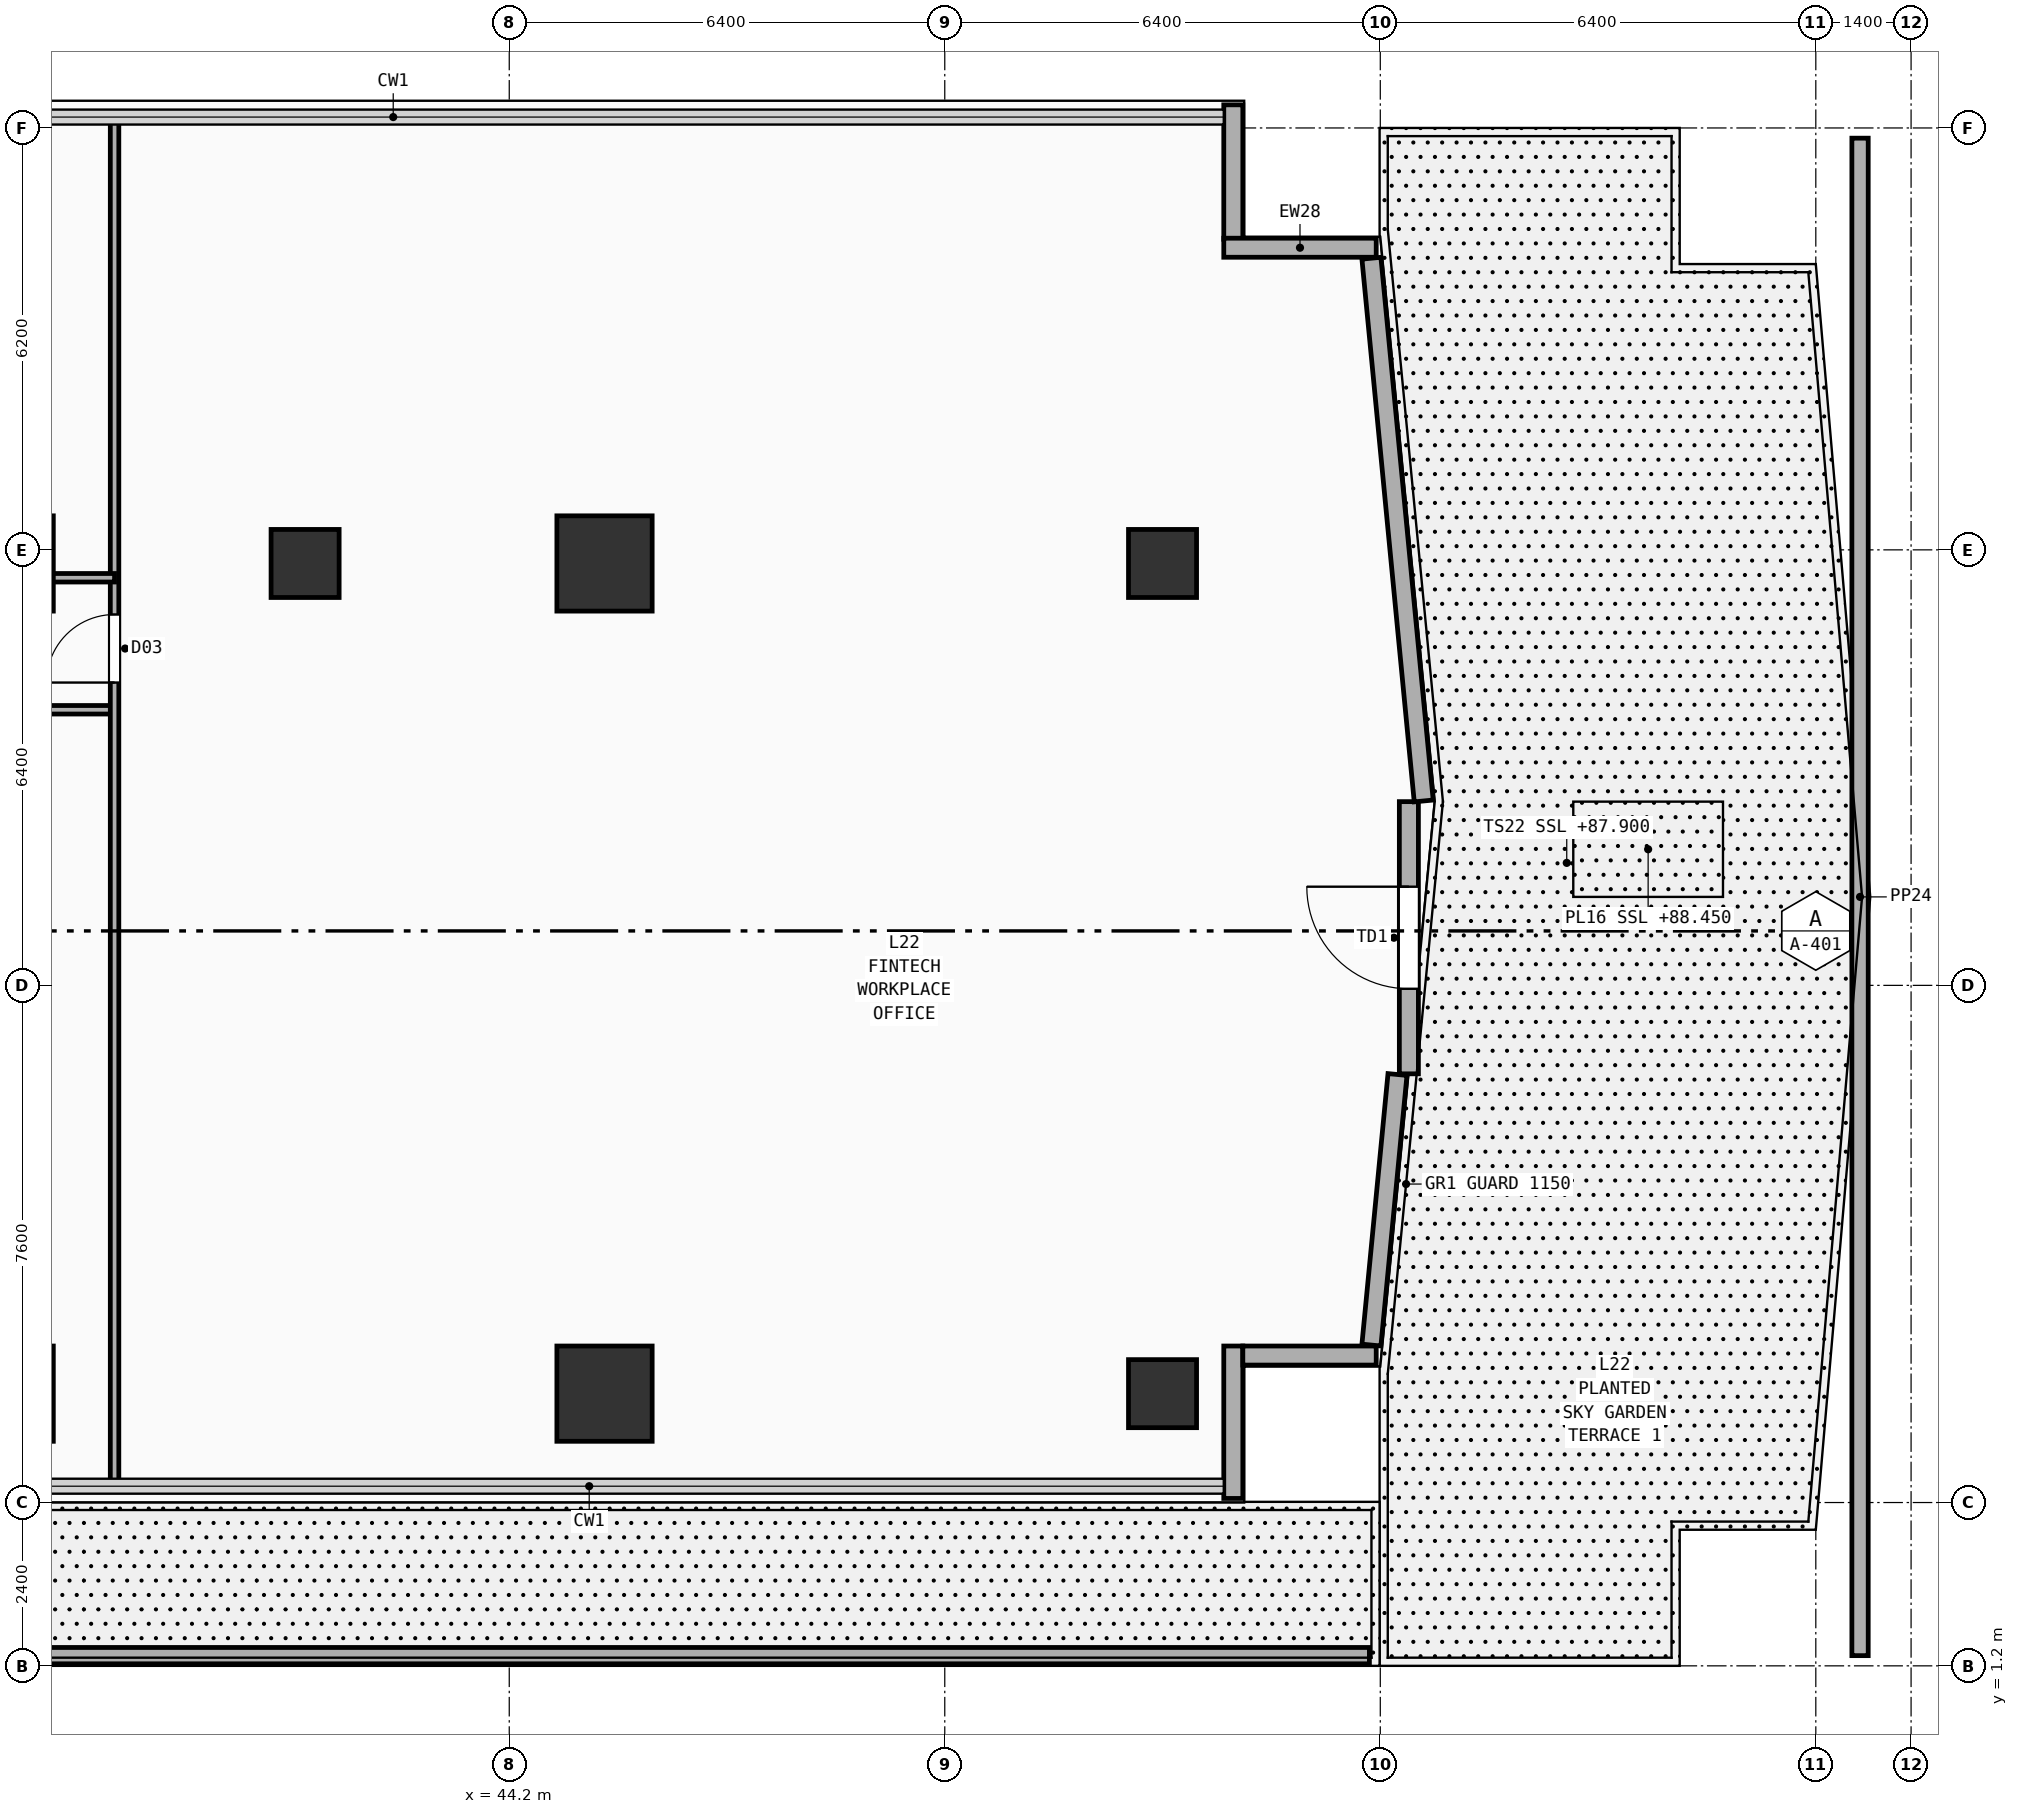
"""IFC4 building model, lengths in metres.
Left out: names, types, materials, properties, quantities, classifications, styles, units other than length and angle.
Written with IfcOpenShell. Run it as: python <this file> out.ifc"""

import sys

from ifc_helpers import new_model, si_unit, direction, frame, frame_2d, origin, origin_2d, place, context, subcontext, project, spatial, rectangle, extrude, element, fill, save


model = new_model("IFC4")
c1 = context("Model", 3, precision=1e-05, world=origin(), true_north=direction((0.0, 1.0)))
c2 = subcontext(c1, "Body", "Model", "MODEL_VIEW")
j1 = project(units=[si_unit("LENGTHUNIT", "METRE"), si_unit("PLANEANGLEUNIT", "RADIAN")], contexts=[c1])
p1 = place(None, origin())
s1 = spatial("IfcSite", under=j1, at=p1, CompositionType="ELEMENT")
p2 = place(p1, origin())
s2 = spatial("IfcBuilding", under=s1, at=p2, CompositionType="ELEMENT")
p3 = place(p2, frame((0.0, 0.0, 87.9)))
s3 = spatial("IfcBuildingStorey", under=s2, at=p3, CompositionType="ELEMENT", Elevation=87.9)
for number, where, z_axis, x_axis in (
    (1, (36.8, 5.2, 0.0), (0.0, 0.0, 1.0), (1.0, 0.0, 0.0)),
    (2, (45.6, 5.2, 0.0), (0.0, 0.0, 1.0), (1.0, 0.0, 0.0)),
    (3, (36.8, 17.4, 0.0), (0.0, 0.0, 1.0), (1.0, 0.0, 0.0)),
    (4, (45.6, 17.4, 0.0), (0.0, 0.0, 1.0), (1.0, 0.0, 0.0)),
):
    element("IfcColumn", number, at=place(p3, frame(where, z_axis=z_axis, x_axis=x_axis)), inside=s3, PredefinedType="COLUMN", context=c2, shape_type="SweptSolid", body=[
        extrude(rectangle(XDim=1.4, YDim=1.4, at=origin_2d()), origin(), (0.0, 0.0, 1.0), 3.54),
    ])
for number, where, z_axis, x_axis in (
    (5, (53.8, 5.2, 0.0), (0.0, 0.0, 1.0), (1.0, 0.0, 0.0)),
    (6, (53.8, 17.4, 0.0), (0.0, 0.0, 1.0), (1.0, 0.0, 0.0)),
    (7, (41.2, 17.4, 0.0), (0.0, 0.0, 1.0), (1.0, 0.0, 0.0)),
):
    element("IfcColumn", number, at=place(p3, frame(where, z_axis=z_axis, x_axis=x_axis)), inside=s3, PredefinedType="COLUMN", context=c2, shape_type="SweptSolid", body=[
        extrude(rectangle(XDim=1.0, YDim=1.0, at=origin_2d()), origin(), (0.0, 0.0, 1.0), 3.54),
    ])
p4 = place(p3, frame((57.42, 9.9, 0.0), z_axis=(0.0, 0.0, 1.0), x_axis=(0.0, 1.0, 0.0)))
e8 = element("IfcWall", 8, at=p4, inside=s3, PredefinedType="SOLIDWALL", context=c2, shape_type="SweptSolid", body=[
    extrude(rectangle(XDim=4.0, YDim=0.28, at=frame_2d((2.0, 0.0))), origin(), (0.0, 0.0, 1.0), 3.54),
])
p5 = place(p4, frame((1.25, 0.0, 0.0)))
e9 = element("IfcOpeningElement", 9, at=p5, cuts=e8, PredefinedType="OPENING", context=c2, shape_type="SweptSolid", body=[
    extrude(rectangle(XDim=1.5, YDim=2.25, at=frame_2d((0.75, 1.125))), frame((0.0, 0.15, 0.0), z_axis=(0.0, -1.0, 0.0), x_axis=(1.0, 0.0, 0.0)), (0.0, 0.0, 1.0), 0.3),
])
p6 = place(p3, frame((64.05, 1.35, 0.0), z_axis=(0.0, 0.0, 1.0), x_axis=(0.0, 1.0, 0.0)))
e10 = element("IfcWall", 10, at=p6, inside=s3, PredefinedType="PARAPET", context=c2, shape_type="SweptSolid", body=[
    extrude(rectangle(XDim=22.3, YDim=0.24, at=frame_2d((11.15, 0.0))), origin(), (0.0, 0.0, 1.0), 0.42),
])
p7 = place(p3, frame((1.55, 1.35, 0.0), z_axis=(0.0, 0.0, 1.0), x_axis=(1.0, 0.0, 0.0)))
e11 = element("IfcWall", 11, at=p7, inside=s3, PredefinedType="PARAPET", context=c2, shape_type="SweptSolid", body=[
    extrude(rectangle(XDim=55.29, YDim=0.24, at=frame_2d((27.645, 0.0))), origin(), (0.0, 0.0, 1.0), 0.42),
])
p8 = place(p3, frame((54.84, 3.66, 0.0), z_axis=(0.0, 0.0, 1.0), x_axis=(0.0, 1.0, 0.0)))
e12 = element("IfcWall", 12, at=p8, inside=s3, PredefinedType="SOLIDWALL", context=c2, shape_type="SweptSolid", body=[
    extrude(rectangle(XDim=2.24, YDim=0.28, at=frame_2d((1.12, 0.0))), origin(), (0.0, 0.0, 1.0), 3.54),
])
p9 = place(p3, frame((54.98, 5.76, 0.0), z_axis=(0.0, 0.0, 1.0), x_axis=(1.0, 0.0, 0.0)))
e13 = element("IfcWall", 13, at=p9, inside=s3, PredefinedType="SOLIDWALL", context=c2, shape_type="SweptSolid", body=[
    extrude(rectangle(XDim=1.96, YDim=0.28, at=frame_2d((0.98, 0.0))), origin(), (0.0, 0.0, 1.0), 3.54),
])
p10 = place(p3, frame((54.84, 22.165, 0.0), z_axis=(0.0, 0.0, 1.0), x_axis=(0.0, 1.0, 0.0)))
e14 = element("IfcWall", 14, at=p10, inside=s3, PredefinedType="SOLIDWALL", context=c2, shape_type="SweptSolid", body=[
    extrude(rectangle(XDim=1.975, YDim=0.28, at=frame_2d((0.987, 0.0))), origin(), (0.0, 0.0, 1.0), 3.54),
])
p11 = place(p3, frame((54.7, 22.04, 0.0), z_axis=(0.0, 0.0, 1.0), x_axis=(1.0, 0.0, 0.0)))
e15 = element("IfcWall", 15, at=p11, inside=s3, PredefinedType="SOLIDWALL", context=c2, shape_type="SweptSolid", body=[
    extrude(rectangle(XDim=2.24, YDim=0.28, at=frame_2d((1.12, 0.0))), origin(), (0.0, 0.0, 1.0), 3.54),
])
p12 = place(p3, frame((56.869, 5.914, 0.0), z_axis=(0.0, 0.0, 1.0), x_axis=(0.095962807789, 0.99538492028, 0.0)))
e16 = element("IfcWall", 16, at=p12, inside=s3, PredefinedType="SOLIDWALL", context=c2, shape_type="SweptSolid", body=[
    extrude(rectangle(XDim=3.994, YDim=0.28, at=frame_2d((1.997, 0.0))), origin(), (0.0, 0.0, 1.0), 3.54),
])
p13 = place(p3, frame((57.638, 13.91, 0.0), z_axis=(0.0, 0.0, 1.0), x_axis=(-0.095943464516, 0.995386784932, 0.0)))
e17 = element("IfcWall", 17, at=p13, inside=s3, PredefinedType="SOLIDWALL", context=c2, shape_type="SweptSolid", body=[
    extrude(rectangle(XDim=8.013, YDim=0.28, at=frame_2d((4.006, 0.0))), origin(), (0.0, 0.0, 1.0), 3.54),
])
p14 = place(p3, frame((31.95, 15.25, 0.0), z_axis=(0.0, 0.0, 1.0), x_axis=(1.0, 0.0, 0.0)))
e18 = element("IfcWall", 18, at=p14, inside=s3, PredefinedType="PARTITIONING", context=c2, shape_type="SweptSolid", body=[
    extrude(rectangle(XDim=6.45, YDim=0.125, at=frame_2d((3.225, 0.0))), origin(), (0.0, 0.0, 1.0), 3.09),
])
p15 = place(p14, frame((2.275, 0.0, 0.0)))
e19 = element("IfcOpeningElement", 19, at=p15, cuts=e18, PredefinedType="OPENING", context=c2, shape_type="SweptSolid", body=[
    extrude(rectangle(XDim=0.95, YDim=2.15, at=frame_2d((0.475, 1.075))), frame((0.0, 0.073, 0.0), z_axis=(0.0, -1.0, 0.0), x_axis=(1.0, 0.0, 0.0)), (0.0, 0.0, 1.0), 0.145),
])
p16 = place(p3, frame((38.4, 3.84, 0.0), z_axis=(0.0, 0.0, 1.0), x_axis=(0.0, 1.0, 0.0)))
e20 = element("IfcWall", 20, at=p16, inside=s3, PredefinedType="PARTITIONING", context=c2, shape_type="SweptSolid", body=[
    extrude(rectangle(XDim=20.12, YDim=0.125, at=frame_2d((10.06, 0.0))), origin(), (0.0, 0.0, 1.0), 3.54),
])
p17 = place(p16, frame((11.81, 0.0, 0.0)))
e21 = element("IfcOpeningElement", 21, at=p17, cuts=e20, PredefinedType="OPENING", context=c2, shape_type="SweptSolid", body=[
    extrude(rectangle(XDim=1.0, YDim=2.2, at=frame_2d((0.5, 1.1))), frame((0.0, 0.073, 0.0), z_axis=(0.0, -1.0, 0.0), x_axis=(1.0, 0.0, 0.0)), (0.0, 0.0, 1.0), 0.145),
])
p18 = place(p3, frame((23.65, 17.19, 0.0), z_axis=(0.0, 0.0, 1.0), x_axis=(1.0, 0.0, 0.0)))
e22 = element("IfcWall", 22, at=p18, inside=s3, PredefinedType="PARTITIONING", context=c2, shape_type="SweptSolid", body=[
    extrude(rectangle(XDim=14.75, YDim=0.125, at=frame_2d((7.375, 0.0))), origin(), (0.0, 0.0, 1.0), 3.24),
])
p19 = place(p18, frame((1.4, 0.0, 0.0)))
e23 = element("IfcOpeningElement", 23, at=p19, cuts=e22, PredefinedType="OPENING", context=c2, shape_type="SweptSolid", body=[
    extrude(rectangle(XDim=0.95, YDim=2.15, at=frame_2d((0.475, 1.075))), frame((0.0, 0.073, 0.0), z_axis=(0.0, -1.0, 0.0), x_axis=(1.0, 0.0, 0.0)), (0.0, 0.0, 1.0), 0.145),
])
p20 = place(p18, frame((9.846, 0.0, 0.0)))
e24 = element("IfcOpeningElement", 24, at=p20, cuts=e22, PredefinedType="OPENING", context=c2, shape_type="SweptSolid", body=[
    extrude(rectangle(XDim=0.95, YDim=2.15, at=frame_2d((0.475, 1.075))), frame((0.0, 0.073, 0.0), z_axis=(0.0, -1.0, 0.0), x_axis=(1.0, 0.0, 0.0)), (0.0, 0.0, 1.0), 0.145),
])
p21 = place(p5, frame((1.5, 0.0, 0.0), z_axis=(0.0, 0.0, 1.0), x_axis=(-1.0, 0.0, 0.0)))
e25 = element("IfcDoor", 25, at=p21, inside=s3, OperationType="SINGLE_SWING_LEFT", PredefinedType="DOOR", context=c2, shape_type="SweptSolid", body=[
    extrude(rectangle(XDim=1.5, YDim=2.25, at=frame_2d((0.75, 1.125))), frame((0.0, 0.025, 0.0), z_axis=(0.0, -1.0, 0.0), x_axis=(1.0, 0.0, 0.0)), (0.0, 0.0, 1.0), 0.05),
])
fill(e9, e25)
p22 = place(p17, origin())
e26 = element("IfcDoor", 26, at=p22, inside=s3, OperationType="SINGLE_SWING_LEFT", PredefinedType="DOOR", context=c2, shape_type="SweptSolid", body=[
    extrude(rectangle(XDim=1.0, YDim=2.2, at=frame_2d((0.5, 1.1))), frame((0.0, 0.025, 0.0), z_axis=(0.0, -1.0, 0.0), x_axis=(1.0, 0.0, 0.0)), (0.0, 0.0, 1.0), 0.05),
])
fill(e21, e26)
save(model, sys.argv[1])
